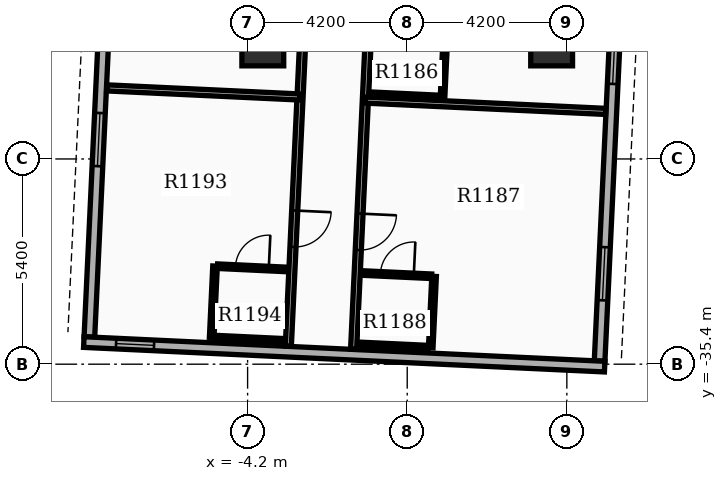
"""IFC4 building model, lengths in metres.
Left out: names, types, materials, properties, quantities, classifications, styles, units other than length and angle.
Written with IfcOpenShell. Run it as: python <this file> out.ifc"""

import sys

from ifc_helpers import new_model, si_unit, direction, frame, frame_2d, origin, origin_2d, place, context, subcontext, project, spatial, rectangle, extrude, element, fill, save


model = new_model("IFC4")
c1 = context("Model", 3, precision=1e-05, world=origin(), true_north=direction((0.0, 1.0)))
c2 = subcontext(c1, "Body", "Model", "MODEL_VIEW")
j1 = project(units=[si_unit("LENGTHUNIT", "METRE"), si_unit("PLANEANGLEUNIT", "RADIAN")], contexts=[c1])
p1 = place(None, origin())
s1 = spatial("IfcSite", under=j1, at=p1, CompositionType="ELEMENT")
p2 = place(p1, origin())
s2 = spatial("IfcBuilding", under=s1, at=p2, CompositionType="ELEMENT")
p3 = place(p2, frame((0.0, 0.0, 75.6)))
s3 = spatial("IfcBuildingStorey", under=s2, at=p3, CompositionType="ELEMENT", Elevation=75.6)
for number, where, z_axis, x_axis in (
    (1, (-3.8, -27.0, 0.0), (0.0, 0.0, 1.0), (1.0, 0.0, 0.0)),
    (2, (3.8, -27.0, 0.0), (0.0, 0.0, 1.0), (1.0, 0.0, 0.0)),
):
    element("IfcColumn", number, at=place(p3, frame(where, z_axis=z_axis, x_axis=x_axis)), inside=s3, PredefinedType="COLUMN", context=c2, shape_type="SweptSolid", body=[
        extrude(rectangle(XDim=1.1, YDim=1.1, at=origin_2d()), origin(), (0.0, 0.0, 1.0), 3.9),
    ])
p4 = place(p3, frame((-7.416, -14.607, 0.0), z_axis=(0.0, 0.0, 1.0), x_axis=(-0.047103473814, -0.998890015344, 0.0)))
e3 = element("IfcWall", 3, at=p4, inside=s3, PredefinedType="STANDARD", context=c2, shape_type="SweptSolid", body=[
    extrude(rectangle(XDim=20.1, YDim=0.28, at=frame_2d((10.05, 0.0))), origin(), (0.0, 0.0, 1.0), 2.91),
])
p5 = place(p4, frame((1.6, 0.0, 0.8)))
e4 = element("IfcOpeningElement", 4, at=p5, cuts=e3, PredefinedType="OPENING", context=c2, shape_type="SweptSolid", body=[
    extrude(rectangle(XDim=1.4, YDim=1.6, at=frame_2d((0.7, 0.8))), frame((0.0, 0.15, 0.0), z_axis=(0.0, -1.0, 0.0), x_axis=(1.0, 0.0, 0.0)), (0.0, 0.0, 1.0), 0.3),
])
p6 = place(p4, frame((7.05, 0.0, 0.8)))
e5 = element("IfcOpeningElement", 5, at=p6, cuts=e3, PredefinedType="OPENING", context=c2, shape_type="SweptSolid", body=[
    extrude(rectangle(XDim=1.4, YDim=1.6, at=frame_2d((0.7, 0.8))), frame((0.0, 0.15, 0.0), z_axis=(0.0, -1.0, 0.0), x_axis=(1.0, 0.0, 0.0)), (0.0, 0.0, 1.0), 0.3),
])
p7 = place(p4, frame((10.25, 0.0, 0.8)))
e6 = element("IfcOpeningElement", 6, at=p7, cuts=e3, PredefinedType="OPENING", context=c2, shape_type="SweptSolid", body=[
    extrude(rectangle(XDim=1.4, YDim=1.6, at=frame_2d((0.7, 0.8))), frame((0.0, 0.15, 0.0), z_axis=(0.0, -1.0, 0.0), x_axis=(1.0, 0.0, 0.0)), (0.0, 0.0, 1.0), 0.3),
])
p8 = place(p4, frame((14.2, 0.0, 0.8)))
e7 = element("IfcOpeningElement", 7, at=p8, cuts=e3, PredefinedType="OPENING", context=c2, shape_type="SweptSolid", body=[
    extrude(rectangle(XDim=1.4, YDim=1.6, at=frame_2d((0.7, 0.8))), frame((0.0, 0.15, 0.0), z_axis=(0.0, -1.0, 0.0), x_axis=(1.0, 0.0, 0.0)), (0.0, 0.0, 1.0), 0.3),
])
p9 = place(p3, frame((5.062, -35.318, 0.0), z_axis=(0.0, 0.0, 1.0), x_axis=(0.047103473814, 0.998890015344, 0.0)))
e8 = element("IfcWall", 8, at=p9, inside=s3, PredefinedType="STANDARD", context=c2, shape_type="SweptSolid", body=[
    extrude(rectangle(XDim=20.1, YDim=0.28, at=frame_2d((10.05, 0.0))), origin(), (0.0, 0.0, 1.0), 2.91),
])
p10 = place(p9, frame((1.6, 0.0, 0.8)))
e9 = element("IfcOpeningElement", 9, at=p10, cuts=e8, PredefinedType="OPENING", context=c2, shape_type="SweptSolid", body=[
    extrude(rectangle(XDim=1.4, YDim=1.6, at=frame_2d((0.7, 0.8))), frame((0.0, 0.15, 0.0), z_axis=(0.0, -1.0, 0.0), x_axis=(1.0, 0.0, 0.0)), (0.0, 0.0, 1.0), 0.3),
])
p11 = place(p9, frame((7.3, 0.0, 0.8)))
e10 = element("IfcOpeningElement", 10, at=p11, cuts=e8, PredefinedType="OPENING", context=c2, shape_type="SweptSolid", body=[
    extrude(rectangle(XDim=1.4, YDim=1.6, at=frame_2d((0.7, 0.8))), frame((0.0, 0.15, 0.0), z_axis=(0.0, -1.0, 0.0), x_axis=(1.0, 0.0, 0.0)), (0.0, 0.0, 1.0), 0.3),
])
p12 = place(p9, frame((10.5, 0.0, 0.8)))
e11 = element("IfcOpeningElement", 11, at=p12, cuts=e8, PredefinedType="OPENING", context=c2, shape_type="SweptSolid", body=[
    extrude(rectangle(XDim=1.4, YDim=1.6, at=frame_2d((0.7, 0.8))), frame((0.0, 0.15, 0.0), z_axis=(0.0, -1.0, 0.0), x_axis=(1.0, 0.0, 0.0)), (0.0, 0.0, 1.0), 0.3),
])
p13 = place(p9, frame((14.2, 0.0, 0.8)))
e12 = element("IfcOpeningElement", 12, at=p13, cuts=e8, PredefinedType="OPENING", context=c2, shape_type="SweptSolid", body=[
    extrude(rectangle(XDim=1.4, YDim=1.6, at=frame_2d((0.7, 0.8))), frame((0.0, 0.15, 0.0), z_axis=(0.0, -1.0, 0.0), x_axis=(1.0, 0.0, 0.0)), (0.0, 0.0, 1.0), 0.3),
])
p14 = place(p3, frame((-8.51, -34.818, 0.0), z_axis=(0.0, 0.0, 1.0), x_axis=(0.998890092147, -0.047101845086, 0.0)))
e13 = element("IfcWall", 13, at=p14, inside=s3, PredefinedType="STANDARD", context=c2, shape_type="SweptSolid", body=[
    extrude(rectangle(XDim=13.72, YDim=0.28, at=frame_2d((6.86, 0.0))), origin(), (0.0, 0.0, 1.0), 2.91),
])
p15 = place(p14, frame((0.85, 0.0, 0.85)))
e14 = element("IfcOpeningElement", 14, at=p15, cuts=e13, PredefinedType="OPENING", context=c2, shape_type="SweptSolid", body=[
    extrude(rectangle(XDim=1.0, YDim=1.5, at=frame_2d((0.5, 0.75))), frame((0.0, 0.15, 0.0), z_axis=(0.0, -1.0, 0.0), x_axis=(1.0, 0.0, 0.0)), (0.0, 0.0, 1.0), 0.3),
])
p16 = place(p3, frame((-0.46, -14.845, 0.0), z_axis=(0.0, 0.0, 1.0), x_axis=(-0.047105352469, -0.998889926753, 0.0)))
e15 = element("IfcWall", 15, at=p16, inside=s3, PredefinedType="PARTITIONING", context=c2, shape_type="SweptSolid", body=[
    extrude(rectangle(XDim=20.182, YDim=0.16, at=frame_2d((10.091, 0.0))), origin(), (0.0, 0.0, 1.0), 2.9),
])
p17 = place(p16, frame((0.731, 0.0, 0.0)))
e16 = element("IfcOpeningElement", 16, at=p17, cuts=e15, PredefinedType="OPENING", context=c2, shape_type="SweptSolid", body=[
    extrude(rectangle(XDim=0.96, YDim=2.15, at=frame_2d((0.48, 1.075))), frame((0.0, 0.09, 0.0), z_axis=(0.0, -1.0, 0.0), x_axis=(1.0, 0.0, 0.0)), (0.0, 0.0, 1.0), 0.18),
])
p18 = place(p16, frame((7.896, 0.0, 0.0)))
e17 = element("IfcOpeningElement", 17, at=p18, cuts=e15, PredefinedType="OPENING", context=c2, shape_type="SweptSolid", body=[
    extrude(rectangle(XDim=0.96, YDim=2.15, at=frame_2d((0.48, 1.075))), frame((0.0, 0.09, 0.0), z_axis=(0.0, -1.0, 0.0), x_axis=(1.0, 0.0, 0.0)), (0.0, 0.0, 1.0), 0.18),
])
p19 = place(p16, frame((16.611, 0.0, 0.0)))
e18 = element("IfcOpeningElement", 18, at=p19, cuts=e15, PredefinedType="OPENING", context=c2, shape_type="SweptSolid", body=[
    extrude(rectangle(XDim=0.96, YDim=2.15, at=frame_2d((0.48, 1.075))), frame((0.0, 0.09, 0.0), z_axis=(0.0, -1.0, 0.0), x_axis=(1.0, 0.0, 0.0)), (0.0, 0.0, 1.0), 0.18),
])
p20 = place(p3, frame((-1.101, -28.451, 0.0), z_axis=(0.0, 0.0, 1.0), x_axis=(0.99889113728, -0.047079675697, 0.0)))
e19 = element("IfcWall", 19, at=p20, inside=s3, PredefinedType="PARTITIONING", context=c2, shape_type="SweptSolid", body=[
    extrude(rectangle(XDim=6.332, YDim=0.16, at=frame_2d((3.166, 0.0))), origin(), (0.0, 0.0, 1.0), 2.9),
])
p21 = place(p3, frame((-0.954, -28.298, 0.0), z_axis=(0.0, 0.0, 1.0), x_axis=(0.998891083954, -0.047080807099, 0.0)))
e20 = element("IfcWall", 20, at=p21, inside=s3, PredefinedType="PARTITIONING", context=c2, shape_type="SweptSolid", body=[
    extrude(rectangle(XDim=1.82, YDim=0.12, at=frame_2d((0.91, 0.0))), origin(), (0.0, 0.0, 1.0), 2.9),
])
p22 = place(p3, frame((1.017, -26.508, 0.0), z_axis=(0.0, 0.0, 1.0), x_axis=(-0.04700985207, -0.998894425757, 0.0)))
e21 = element("IfcWall", 21, at=p22, inside=s3, PredefinedType="PARTITIONING", context=c2, shape_type="SweptSolid", body=[
    extrude(rectangle(XDim=1.88, YDim=0.12, at=frame_2d((0.94, 0.0))), origin(), (0.0, 0.0, 1.0), 2.9),
])
p23 = place(p3, frame((-1.176, -33.001, 0.0), z_axis=(0.0, 0.0, 1.0), x_axis=(0.998890786574, -0.047087116047, 0.0)))
e22 = element("IfcWall", 22, at=p23, inside=s3, PredefinedType="PARTITIONING", context=c2, shape_type="SweptSolid", body=[
    extrude(rectangle(XDim=1.82, YDim=0.12, at=frame_2d((0.91, 0.0))), origin(), (0.0, 0.0, 1.0), 2.9),
])
p24 = place(p23, frame((0.47, 0.0, 0.0)))
e23 = element("IfcOpeningElement", 23, at=p24, cuts=e22, PredefinedType="OPENING", context=c2, shape_type="SweptSolid", body=[
    extrude(rectangle(XDim=0.88, YDim=2.1, at=frame_2d((0.44, 1.05))), frame((0.0, 0.07, 0.0), z_axis=(0.0, -1.0, 0.0), x_axis=(1.0, 0.0, 0.0)), (0.0, 0.0, 1.0), 0.14),
])
p25 = place(p3, frame((-1.264, -34.879, 0.0), z_axis=(0.0, 0.0, 1.0), x_axis=(0.998890786574, -0.047087116047, 0.0)))
e24 = element("IfcWall", 24, at=p25, inside=s3, PredefinedType="PARTITIONING", context=c2, shape_type="SweptSolid", body=[
    extrude(rectangle(XDim=1.82, YDim=0.12, at=frame_2d((0.91, 0.0))), origin(), (0.0, 0.0, 1.0), 2.9),
])
p26 = place(p3, frame((0.707, -33.09, 0.0), z_axis=(0.0, 0.0, 1.0), x_axis=(-0.047139425368, -0.998888319371, 0.0)))
e25 = element("IfcWall", 25, at=p26, inside=s3, PredefinedType="PARTITIONING", context=c2, shape_type="SweptSolid", body=[
    extrude(rectangle(XDim=1.88, YDim=0.12, at=frame_2d((0.94, 0.0))), origin(), (0.0, 0.0, 1.0), 2.9),
])
p27 = place(p3, frame((-2.178, -14.764, 0.0), z_axis=(0.0, 0.0, 1.0), x_axis=(-0.047105921672, -0.998889899911, 0.0)))
e26 = element("IfcWall", 26, at=p27, inside=s3, PredefinedType="PARTITIONING", context=c2, shape_type="SweptSolid", body=[
    extrude(rectangle(XDim=20.182, YDim=0.16, at=frame_2d((10.091, 0.0))), origin(), (0.0, 0.0, 1.0), 2.9),
])
p28 = place(p27, frame((2.636, 0.0, 0.0)))
e27 = element("IfcOpeningElement", 27, at=p28, cuts=e26, PredefinedType="OPENING", context=c2, shape_type="SweptSolid", body=[
    extrude(rectangle(XDim=0.96, YDim=2.15, at=frame_2d((0.48, 1.075))), frame((0.0, 0.09, 0.0), z_axis=(0.0, -1.0, 0.0), x_axis=(1.0, 0.0, 0.0)), (0.0, 0.0, 1.0), 0.18),
])
p29 = place(p27, frame((9.243, 0.0, 0.0)))
e28 = element("IfcOpeningElement", 28, at=p29, cuts=e26, PredefinedType="OPENING", context=c2, shape_type="SweptSolid", body=[
    extrude(rectangle(XDim=0.96, YDim=2.15, at=frame_2d((0.48, 1.075))), frame((0.0, 0.09, 0.0), z_axis=(0.0, -1.0, 0.0), x_axis=(1.0, 0.0, 0.0)), (0.0, 0.0, 1.0), 0.18),
])
p30 = place(p27, frame((16.611, 0.0, 0.0)))
e29 = element("IfcOpeningElement", 29, at=p30, cuts=e26, PredefinedType="OPENING", context=c2, shape_type="SweptSolid", body=[
    extrude(rectangle(XDim=0.96, YDim=2.15, at=frame_2d((0.48, 1.075))), frame((0.0, 0.09, 0.0), z_axis=(0.0, -1.0, 0.0), x_axis=(1.0, 0.0, 0.0)), (0.0, 0.0, 1.0), 0.18),
])
p31 = place(p3, frame((-2.82, -28.37, 0.0), z_axis=(0.0, 0.0, 1.0), x_axis=(-0.998890911052, 0.047084475335, 0.0)))
e30 = element("IfcWall", 30, at=p31, inside=s3, PredefinedType="PARTITIONING", context=c2, shape_type="SweptSolid", body=[
    extrude(rectangle(XDim=5.092, YDim=0.16, at=frame_2d((2.546, 0.0))), origin(), (0.0, 0.0, 1.0), 2.9),
])
p32 = place(p3, frame((-4.992, -32.821, 0.0), z_axis=(0.0, 0.0, 1.0), x_axis=(0.998891083954, -0.047080807099, 0.0)))
e31 = element("IfcWall", 31, at=p32, inside=s3, PredefinedType="PARTITIONING", context=c2, shape_type="SweptSolid", body=[
    extrude(rectangle(XDim=1.82, YDim=0.12, at=frame_2d((0.91, 0.0))), origin(), (0.0, 0.0, 1.0), 2.9),
])
p33 = place(p32, frame((0.47, 0.0, 0.0)))
e32 = element("IfcOpeningElement", 32, at=p33, cuts=e31, PredefinedType="OPENING", context=c2, shape_type="SweptSolid", body=[
    extrude(rectangle(XDim=0.88, YDim=2.1, at=frame_2d((0.44, 1.05))), frame((0.0, 0.07, 0.0), z_axis=(0.0, -1.0, 0.0), x_axis=(1.0, 0.0, 0.0)), (0.0, 0.0, 1.0), 0.14),
])
p34 = place(p3, frame((-5.08, -34.699, 0.0), z_axis=(0.0, 0.0, 1.0), x_axis=(0.998890786574, -0.047087116047, 0.0)))
e33 = element("IfcWall", 33, at=p34, inside=s3, PredefinedType="PARTITIONING", context=c2, shape_type="SweptSolid", body=[
    extrude(rectangle(XDim=1.82, YDim=0.12, at=frame_2d((0.91, 0.0))), origin(), (0.0, 0.0, 1.0), 2.9),
])
p35 = place(p3, frame((-5.057, -32.818, 0.0), z_axis=(0.0, 0.0, 1.0), x_axis=(-0.04700985207, -0.998894425757, 0.0)))
e34 = element("IfcWall", 34, at=p35, inside=s3, PredefinedType="PARTITIONING", context=c2, shape_type="SweptSolid", body=[
    extrude(rectangle(XDim=1.88, YDim=0.12, at=frame_2d((0.94, 0.0))), origin(), (0.0, 0.0, 1.0), 2.9),
])
p36 = place(p8, origin())
e35 = element("IfcWindow", 35, at=p36, inside=s3, PartitioningType="SINGLE_PANEL", PredefinedType="WINDOW", context=c2, shape_type="SweptSolid", body=[
    extrude(rectangle(XDim=1.4, YDim=1.6, at=frame_2d((0.7, 0.8))), frame((0.0, 0.03, 0.0), z_axis=(0.0, -1.0, 0.0), x_axis=(1.0, 0.0, 0.0)), (0.0, 0.0, 1.0), 0.06),
])
fill(e7, e35)
p37 = place(p10, origin())
e36 = element("IfcWindow", 36, at=p37, inside=s3, PartitioningType="SINGLE_PANEL", PredefinedType="WINDOW", context=c2, shape_type="SweptSolid", body=[
    extrude(rectangle(XDim=1.4, YDim=1.6, at=frame_2d((0.7, 0.8))), frame((0.0, 0.03, 0.0), z_axis=(0.0, -1.0, 0.0), x_axis=(1.0, 0.0, 0.0)), (0.0, 0.0, 1.0), 0.06),
])
fill(e9, e36)
p38 = place(p11, origin())
e37 = element("IfcWindow", 37, at=p38, inside=s3, PartitioningType="SINGLE_PANEL", PredefinedType="WINDOW", context=c2, shape_type="SweptSolid", body=[
    extrude(rectangle(XDim=1.4, YDim=1.6, at=frame_2d((0.7, 0.8))), frame((0.0, 0.03, 0.0), z_axis=(0.0, -1.0, 0.0), x_axis=(1.0, 0.0, 0.0)), (0.0, 0.0, 1.0), 0.06),
])
fill(e10, e37)
p39 = place(p15, origin())
e38 = element("IfcWindow", 38, at=p39, inside=s3, PartitioningType="SINGLE_PANEL", PredefinedType="WINDOW", context=c2, shape_type="SweptSolid", body=[
    extrude(rectangle(XDim=1.0, YDim=1.5, at=frame_2d((0.5, 0.75))), frame((0.0, 0.03, 0.0), z_axis=(0.0, -1.0, 0.0), x_axis=(1.0, 0.0, 0.0)), (0.0, 0.0, 1.0), 0.06),
])
fill(e14, e38)
p40 = place(p19, origin())
e39 = element("IfcDoor", 39, at=p40, inside=s3, OperationType="SINGLE_SWING_LEFT", PredefinedType="DOOR", context=c2, shape_type="SweptSolid", body=[
    extrude(rectangle(XDim=0.96, YDim=2.15, at=frame_2d((0.48, 1.075))), frame((0.0, 0.025, 0.0), z_axis=(0.0, -1.0, 0.0), x_axis=(1.0, 0.0, 0.0)), (0.0, 0.0, 1.0), 0.05),
])
fill(e18, e39)
p41 = place(p24, origin())
e40 = element("IfcDoor", 40, at=p41, inside=s3, OperationType="SINGLE_SWING_RIGHT", PredefinedType="DOOR", context=c2, shape_type="SweptSolid", body=[
    extrude(rectangle(XDim=0.88, YDim=2.1, at=frame_2d((0.44, 1.05))), frame((0.0, 0.025, 0.0), z_axis=(0.0, -1.0, 0.0), x_axis=(1.0, 0.0, 0.0)), (0.0, 0.0, 1.0), 0.05),
])
fill(e23, e40)
p42 = place(p30, origin())
e41 = element("IfcDoor", 41, at=p42, inside=s3, OperationType="SINGLE_SWING_LEFT", PredefinedType="DOOR", context=c2, shape_type="SweptSolid", body=[
    extrude(rectangle(XDim=0.96, YDim=2.15, at=frame_2d((0.48, 1.075))), frame((0.0, 0.025, 0.0), z_axis=(0.0, -1.0, 0.0), x_axis=(1.0, 0.0, 0.0)), (0.0, 0.0, 1.0), 0.05),
])
fill(e29, e41)
p43 = place(p33, origin())
e42 = element("IfcDoor", 42, at=p43, inside=s3, OperationType="SINGLE_SWING_RIGHT", PredefinedType="DOOR", context=c2, shape_type="SweptSolid", body=[
    extrude(rectangle(XDim=0.88, YDim=2.1, at=frame_2d((0.44, 1.05))), frame((0.0, 0.025, 0.0), z_axis=(0.0, -1.0, 0.0), x_axis=(1.0, 0.0, 0.0)), (0.0, 0.0, 1.0), 0.05),
])
fill(e32, e42)
save(model, sys.argv[1])
